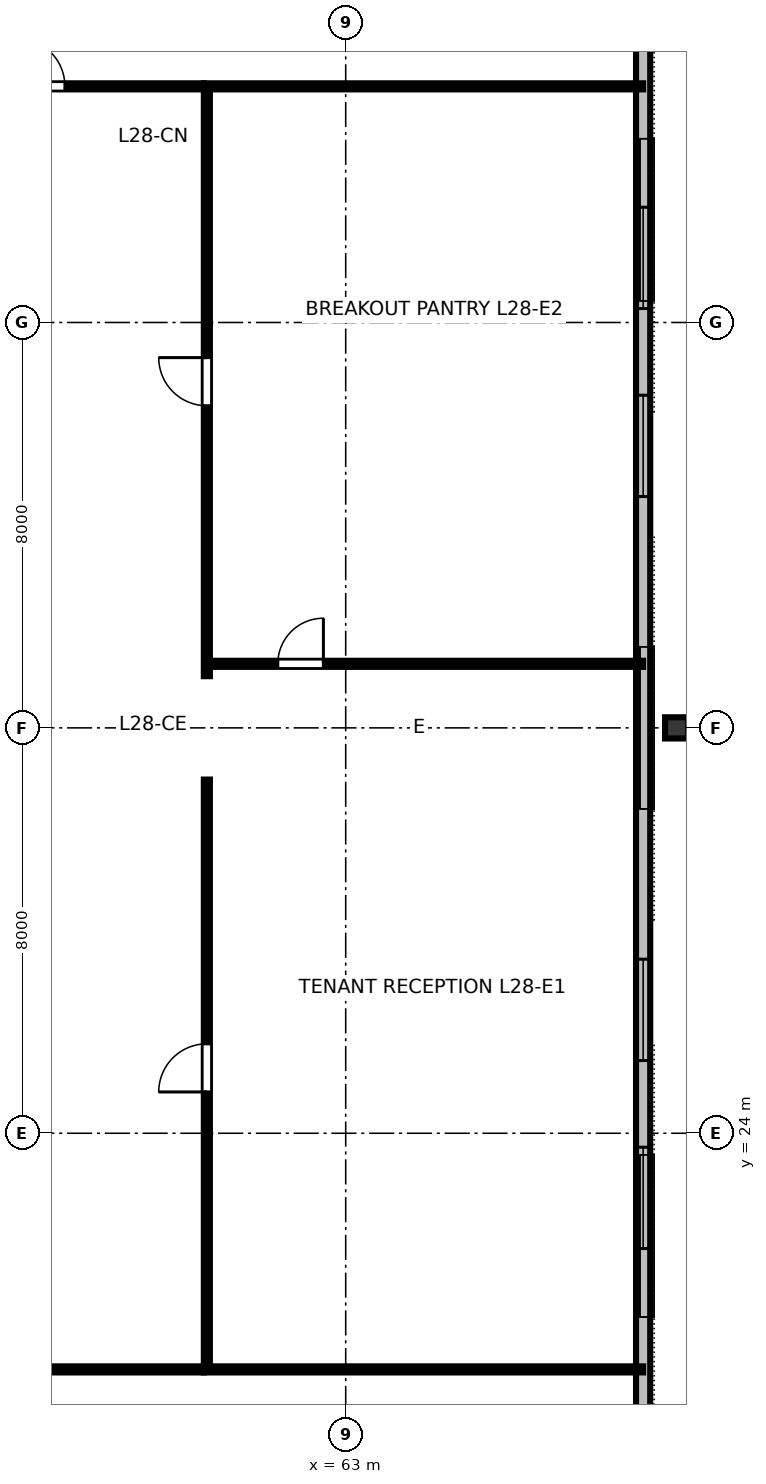
"""IFC4 building model, lengths in metres.
Left out: names, types, materials, properties, quantities, classifications, styles, units other than length and angle.
Written with IfcOpenShell. Run it as: python <this file> out.ifc"""

import sys

from ifc_helpers import new_model, si_unit, direction, frame, frame_2d, origin, origin_2d, place, context, subcontext, project, spatial, rectangle, i_section, extrude, element, fill, save


model = new_model("IFC4")
c1 = context("Model", 3, precision=1e-05, world=origin(), true_north=direction((0.0, 1.0)))
c2 = subcontext(c1, "Body", "Model", "MODEL_VIEW")
j1 = project(units=[si_unit("LENGTHUNIT", "METRE"), si_unit("PLANEANGLEUNIT", "RADIAN")], contexts=[c1])
p1 = place(None, origin())
s1 = spatial("IfcSite", under=j1, at=p1, CompositionType="ELEMENT")
p2 = place(p1, origin())
s2 = spatial("IfcBuilding", under=s1, at=p2, CompositionType="ELEMENT")
p3 = place(p2, frame((0.0, 0.0, 109.6)))
s3 = spatial("IfcBuildingStorey", under=s2, at=p3, CompositionType="ELEMENT", Elevation=109.6)
p4 = place(p3, frame((69.53, 32.0, 0.0), z_axis=(0.0, 0.0, 1.0), x_axis=(0.0, 1.0, 0.0)))
e1 = element("IfcColumn", 1, at=p4, inside=s3, PredefinedType="COLUMN", context=c2, shape_type="SweptSolid", body=[
    extrude(i_section(OverallWidth=0.418, OverallDepth=0.455, WebThickness=0.042, FlangeThickness=0.068, FilletRadius=0.025, at=origin_2d()), origin(), (0.0, 0.0, 1.0), 3.358),
])
p5 = place(p3, frame((68.87, 16.06, 0.0), z_axis=(0.0, 0.0, 1.0), x_axis=(0.0, 1.0, 0.0)))
e2 = element("IfcWall", 2, at=p5, inside=s3, PredefinedType="STANDARD", context=c2, shape_type="SweptSolid", body=[
    extrude(rectangle(XDim=31.88, YDim=0.28, at=frame_2d((15.94, 0.0))), origin(), (0.0, 0.0, 1.0), 3.36),
])
p6 = place(p5, frame((5.665, 0.0, 0.8)))
e3 = element("IfcOpeningElement", 3, at=p6, cuts=e2, PredefinedType="OPENING", context=c2, shape_type="SweptSolid", body=[
    extrude(rectangle(XDim=2.0, YDim=1.95, at=frame_2d((1.0, 0.975))), frame((0.0, 0.15, 0.0), z_axis=(0.0, -1.0, 0.0), x_axis=(1.0, 0.0, 0.0)), (0.0, 0.0, 1.0), 0.3),
])
p7 = place(p5, frame((9.375, 0.0, 0.8)))
e4 = element("IfcOpeningElement", 4, at=p7, cuts=e2, PredefinedType="OPENING", context=c2, shape_type="SweptSolid", body=[
    extrude(rectangle(XDim=2.0, YDim=1.95, at=frame_2d((1.0, 0.975))), frame((0.0, 0.15, 0.0), z_axis=(0.0, -1.0, 0.0), x_axis=(1.0, 0.0, 0.0)), (0.0, 0.0, 1.0), 0.3),
])
p8 = place(p5, frame((20.505, 0.0, 0.8)))
e5 = element("IfcOpeningElement", 5, at=p8, cuts=e2, PredefinedType="OPENING", context=c2, shape_type="SweptSolid", body=[
    extrude(rectangle(XDim=2.0, YDim=1.95, at=frame_2d((1.0, 0.975))), frame((0.0, 0.15, 0.0), z_axis=(0.0, -1.0, 0.0), x_axis=(1.0, 0.0, 0.0)), (0.0, 0.0, 1.0), 0.3),
])
p9 = place(p5, frame((24.215, 0.0, 0.8)))
e6 = element("IfcOpeningElement", 6, at=p9, cuts=e2, PredefinedType="OPENING", context=c2, shape_type="SweptSolid", body=[
    extrude(rectangle(XDim=2.0, YDim=1.95, at=frame_2d((1.0, 0.975))), frame((0.0, 0.15, 0.0), z_axis=(0.0, -1.0, 0.0), x_axis=(1.0, 0.0, 0.0)), (0.0, 0.0, 1.0), 0.3),
])
p10 = place(p3, frame((31.8, 19.34, 0.0), z_axis=(0.0, 0.0, 1.0), x_axis=(1.0, 0.0, 0.0)))
e7 = element("IfcWall", 7, at=p10, inside=s3, PredefinedType="PARTITIONING", context=c2, shape_type="SweptSolid", body=[
    extrude(rectangle(XDim=28.4, YDim=0.12, at=frame_2d((14.2, 0.0))), origin(), (0.0, 0.0, 1.0), 2.64),
])
p11 = place(p10, frame((3.152, 0.0, 0.0)))
e8 = element("IfcOpeningElement", 8, at=p11, cuts=e7, PredefinedType="OPENING", context=c2, shape_type="SweptSolid", body=[
    extrude(rectangle(XDim=0.95, YDim=2.15, at=frame_2d((0.475, 1.075))), frame((0.0, 0.07, 0.0), z_axis=(0.0, -1.0, 0.0), x_axis=(1.0, 0.0, 0.0)), (0.0, 0.0, 1.0), 0.14),
])
p12 = place(p10, frame((10.136, 0.0, 0.0)))
e9 = element("IfcOpeningElement", 9, at=p12, cuts=e7, PredefinedType="OPENING", context=c2, shape_type="SweptSolid", body=[
    extrude(rectangle(XDim=0.95, YDim=2.15, at=frame_2d((0.475, 1.075))), frame((0.0, 0.07, 0.0), z_axis=(0.0, -1.0, 0.0), x_axis=(1.0, 0.0, 0.0)), (0.0, 0.0, 1.0), 0.14),
])
p13 = place(p10, frame((15.813, 0.0, 0.0)))
e10 = element("IfcOpeningElement", 10, at=p13, cuts=e7, PredefinedType="OPENING", context=c2, shape_type="SweptSolid", body=[
    extrude(rectangle(XDim=0.95, YDim=2.15, at=frame_2d((0.475, 1.075))), frame((0.0, 0.07, 0.0), z_axis=(0.0, -1.0, 0.0), x_axis=(1.0, 0.0, 0.0)), (0.0, 0.0, 1.0), 0.14),
])
p14 = place(p10, frame((22.888, 0.0, 0.0)))
e11 = element("IfcOpeningElement", 11, at=p14, cuts=e7, PredefinedType="OPENING", context=c2, shape_type="SweptSolid", body=[
    extrude(rectangle(XDim=0.95, YDim=2.15, at=frame_2d((0.475, 1.075))), frame((0.0, 0.07, 0.0), z_axis=(0.0, -1.0, 0.0), x_axis=(1.0, 0.0, 0.0)), (0.0, 0.0, 1.0), 0.14),
])
p15 = place(p3, frame((31.8, 44.66, 0.0), z_axis=(0.0, 0.0, 1.0), x_axis=(1.0, 0.0, 0.0)))
e12 = element("IfcWall", 12, at=p15, inside=s3, PredefinedType="PARTITIONING", context=c2, shape_type="SweptSolid", body=[
    extrude(rectangle(XDim=28.4, YDim=0.12, at=frame_2d((14.2, 0.0))), origin(), (0.0, 0.0, 1.0), 2.64),
])
p16 = place(p15, frame((3.328, 0.0, 0.0)))
e13 = element("IfcOpeningElement", 13, at=p16, cuts=e12, PredefinedType="OPENING", context=c2, shape_type="SweptSolid", body=[
    extrude(rectangle(XDim=0.95, YDim=2.15, at=frame_2d((0.475, 1.075))), frame((0.0, 0.07, 0.0), z_axis=(0.0, -1.0, 0.0), x_axis=(1.0, 0.0, 0.0)), (0.0, 0.0, 1.0), 0.14),
])
p17 = place(p15, frame((8.901, 0.0, 0.0)))
e14 = element("IfcOpeningElement", 14, at=p17, cuts=e12, PredefinedType="OPENING", context=c2, shape_type="SweptSolid", body=[
    extrude(rectangle(XDim=0.95, YDim=2.15, at=frame_2d((0.475, 1.075))), frame((0.0, 0.07, 0.0), z_axis=(0.0, -1.0, 0.0), x_axis=(1.0, 0.0, 0.0)), (0.0, 0.0, 1.0), 0.14),
])
p18 = place(p15, frame((14.127, 0.0, 0.0)))
e15 = element("IfcOpeningElement", 15, at=p18, cuts=e12, PredefinedType="OPENING", context=c2, shape_type="SweptSolid", body=[
    extrude(rectangle(XDim=0.95, YDim=2.15, at=frame_2d((0.475, 1.075))), frame((0.0, 0.07, 0.0), z_axis=(0.0, -1.0, 0.0), x_axis=(1.0, 0.0, 0.0)), (0.0, 0.0, 1.0), 0.14),
])
p19 = place(p15, frame((19.537, 0.0, 0.0)))
e16 = element("IfcOpeningElement", 16, at=p19, cuts=e12, PredefinedType="OPENING", context=c2, shape_type="SweptSolid", body=[
    extrude(rectangle(XDim=0.95, YDim=2.15, at=frame_2d((0.475, 1.075))), frame((0.0, 0.07, 0.0), z_axis=(0.0, -1.0, 0.0), x_axis=(1.0, 0.0, 0.0)), (0.0, 0.0, 1.0), 0.14),
])
p20 = place(p15, frame((24.708, 0.0, 0.0)))
e17 = element("IfcOpeningElement", 17, at=p20, cuts=e12, PredefinedType="OPENING", context=c2, shape_type="SweptSolid", body=[
    extrude(rectangle(XDim=0.95, YDim=2.15, at=frame_2d((0.475, 1.075))), frame((0.0, 0.07, 0.0), z_axis=(0.0, -1.0, 0.0), x_axis=(1.0, 0.0, 0.0)), (0.0, 0.0, 1.0), 0.14),
])
p21 = place(p3, frame((60.26, 33.264, 0.0), z_axis=(0.0, 0.0, 1.0), x_axis=(1.0, 0.0, 0.0)))
e18 = element("IfcWall", 18, at=p21, inside=s3, PredefinedType="PARTITIONING", context=c2, shape_type="SweptSolid", body=[
    extrude(rectangle(XDim=8.61, YDim=0.12, at=frame_2d((4.305, 0.0))), origin(), (0.0, 0.0, 1.0), 2.64),
])
p22 = place(p21, frame((1.4, 0.0, 0.0)))
e19 = element("IfcOpeningElement", 19, at=p22, cuts=e18, PredefinedType="OPENING", context=c2, shape_type="SweptSolid", body=[
    extrude(rectangle(XDim=0.9, YDim=2.15, at=frame_2d((0.45, 1.075))), frame((0.0, 0.07, 0.0), z_axis=(0.0, -1.0, 0.0), x_axis=(1.0, 0.0, 0.0)), (0.0, 0.0, 1.0), 0.14),
])
p23 = place(p3, frame((60.26, 19.4, 0.0), z_axis=(0.0, 0.0, 1.0), x_axis=(0.0, 1.0, 0.0)))
e20 = element("IfcWall", 20, at=p23, inside=s3, PredefinedType="PARTITIONING", context=c2, shape_type="SweptSolid", body=[
    extrude(rectangle(XDim=11.58, YDim=0.12, at=frame_2d((5.79, 0.0))), origin(), (0.0, 0.0, 1.0), 2.64),
])
p24 = place(p23, frame((5.415, 0.0, 0.0)))
e21 = element("IfcOpeningElement", 21, at=p24, cuts=e20, PredefinedType="OPENING", context=c2, shape_type="SweptSolid", body=[
    extrude(rectangle(XDim=0.95, YDim=2.15, at=frame_2d((0.475, 1.075))), frame((0.0, 0.07, 0.0), z_axis=(0.0, -1.0, 0.0), x_axis=(1.0, 0.0, 0.0)), (0.0, 0.0, 1.0), 0.14),
])
p25 = place(p3, frame((60.26, 33.02, 0.0), z_axis=(0.0, 0.0, 1.0), x_axis=(0.0, 1.0, 0.0)))
e22 = element("IfcWall", 22, at=p25, inside=s3, PredefinedType="PARTITIONING", context=c2, shape_type="SweptSolid", body=[
    extrude(rectangle(XDim=11.58, YDim=0.12, at=frame_2d((5.79, 0.0))), origin(), (0.0, 0.0, 1.0), 2.64),
])
p26 = place(p25, frame((5.337, 0.0, 0.0)))
e23 = element("IfcOpeningElement", 23, at=p26, cuts=e22, PredefinedType="OPENING", context=c2, shape_type="SweptSolid", body=[
    extrude(rectangle(XDim=0.95, YDim=2.15, at=frame_2d((0.475, 1.075))), frame((0.0, 0.07, 0.0), z_axis=(0.0, -1.0, 0.0), x_axis=(1.0, 0.0, 0.0)), (0.0, 0.0, 1.0), 0.14),
])
for number, where, z_axis, x_axis in (
    (24, (60.2, 19.34, 0.0), (0.0, 0.0, 1.0), (1.0, 0.0, 0.0)),
    (25, (60.2, 44.66, 0.0), (0.0, 0.0, 1.0), (1.0, 0.0, 0.0)),
):
    element("IfcWall", number, at=place(p3, frame(where, z_axis=z_axis, x_axis=x_axis)), inside=s3, PredefinedType="PARTITIONING", context=c2, shape_type="SweptSolid", body=[
        extrude(rectangle(XDim=8.67, YDim=0.12, at=frame_2d((4.335, 0.0))), origin(), (0.0, 0.0, 1.0), 2.64),
    ])
p27 = place(p6, origin())
e26 = element("IfcWindow", 26, at=p27, inside=s3, PartitioningType="SINGLE_PANEL", PredefinedType="WINDOW", context=c2, shape_type="SweptSolid", body=[
    extrude(rectangle(XDim=2.0, YDim=1.95, at=frame_2d((1.0, 0.975))), frame((0.0, 0.03, 0.0), z_axis=(0.0, -1.0, 0.0), x_axis=(1.0, 0.0, 0.0)), (0.0, 0.0, 1.0), 0.06),
])
fill(e3, e26)
p28 = place(p7, origin())
e27 = element("IfcWindow", 27, at=p28, inside=s3, PartitioningType="SINGLE_PANEL", PredefinedType="WINDOW", context=c2, shape_type="SweptSolid", body=[
    extrude(rectangle(XDim=2.0, YDim=1.95, at=frame_2d((1.0, 0.975))), frame((0.0, 0.03, 0.0), z_axis=(0.0, -1.0, 0.0), x_axis=(1.0, 0.0, 0.0)), (0.0, 0.0, 1.0), 0.06),
])
fill(e4, e27)
p29 = place(p8, origin())
e28 = element("IfcWindow", 28, at=p29, inside=s3, PartitioningType="SINGLE_PANEL", PredefinedType="WINDOW", context=c2, shape_type="SweptSolid", body=[
    extrude(rectangle(XDim=2.0, YDim=1.95, at=frame_2d((1.0, 0.975))), frame((0.0, 0.03, 0.0), z_axis=(0.0, -1.0, 0.0), x_axis=(1.0, 0.0, 0.0)), (0.0, 0.0, 1.0), 0.06),
])
fill(e5, e28)
p30 = place(p9, origin())
e29 = element("IfcWindow", 29, at=p30, inside=s3, PartitioningType="SINGLE_PANEL", PredefinedType="WINDOW", context=c2, shape_type="SweptSolid", body=[
    extrude(rectangle(XDim=2.0, YDim=1.95, at=frame_2d((1.0, 0.975))), frame((0.0, 0.03, 0.0), z_axis=(0.0, -1.0, 0.0), x_axis=(1.0, 0.0, 0.0)), (0.0, 0.0, 1.0), 0.06),
])
fill(e6, e29)
p31 = place(p20, origin())
e30 = element("IfcDoor", 30, at=p31, inside=s3, OperationType="SINGLE_SWING_LEFT", PredefinedType="DOOR", context=c2, shape_type="SweptSolid", body=[
    extrude(rectangle(XDim=0.95, YDim=2.15, at=frame_2d((0.475, 1.075))), frame((0.0, 0.025, 0.0), z_axis=(0.0, -1.0, 0.0), x_axis=(1.0, 0.0, 0.0)), (0.0, 0.0, 1.0), 0.05),
])
fill(e17, e30)
p32 = place(p22, origin())
e31 = element("IfcDoor", 31, at=p32, inside=s3, OperationType="SINGLE_SWING_RIGHT", PredefinedType="DOOR", context=c2, shape_type="SweptSolid", body=[
    extrude(rectangle(XDim=0.9, YDim=2.15, at=frame_2d((0.45, 1.075))), frame((0.0, 0.025, 0.0), z_axis=(0.0, -1.0, 0.0), x_axis=(1.0, 0.0, 0.0)), (0.0, 0.0, 1.0), 0.05),
])
fill(e19, e31)
p33 = place(p24, origin())
e32 = element("IfcDoor", 32, at=p33, inside=s3, OperationType="SINGLE_SWING_LEFT", PredefinedType="DOOR", context=c2, shape_type="SweptSolid", body=[
    extrude(rectangle(XDim=0.95, YDim=2.15, at=frame_2d((0.475, 1.075))), frame((0.0, 0.025, 0.0), z_axis=(0.0, -1.0, 0.0), x_axis=(1.0, 0.0, 0.0)), (0.0, 0.0, 1.0), 0.05),
])
fill(e21, e32)
p34 = place(p26, origin())
e33 = element("IfcDoor", 33, at=p34, inside=s3, OperationType="SINGLE_SWING_RIGHT", PredefinedType="DOOR", context=c2, shape_type="SweptSolid", body=[
    extrude(rectangle(XDim=0.95, YDim=2.15, at=frame_2d((0.475, 1.075))), frame((0.0, 0.025, 0.0), z_axis=(0.0, -1.0, 0.0), x_axis=(1.0, 0.0, 0.0)), (0.0, 0.0, 1.0), 0.05),
])
fill(e23, e33)
save(model, sys.argv[1])
